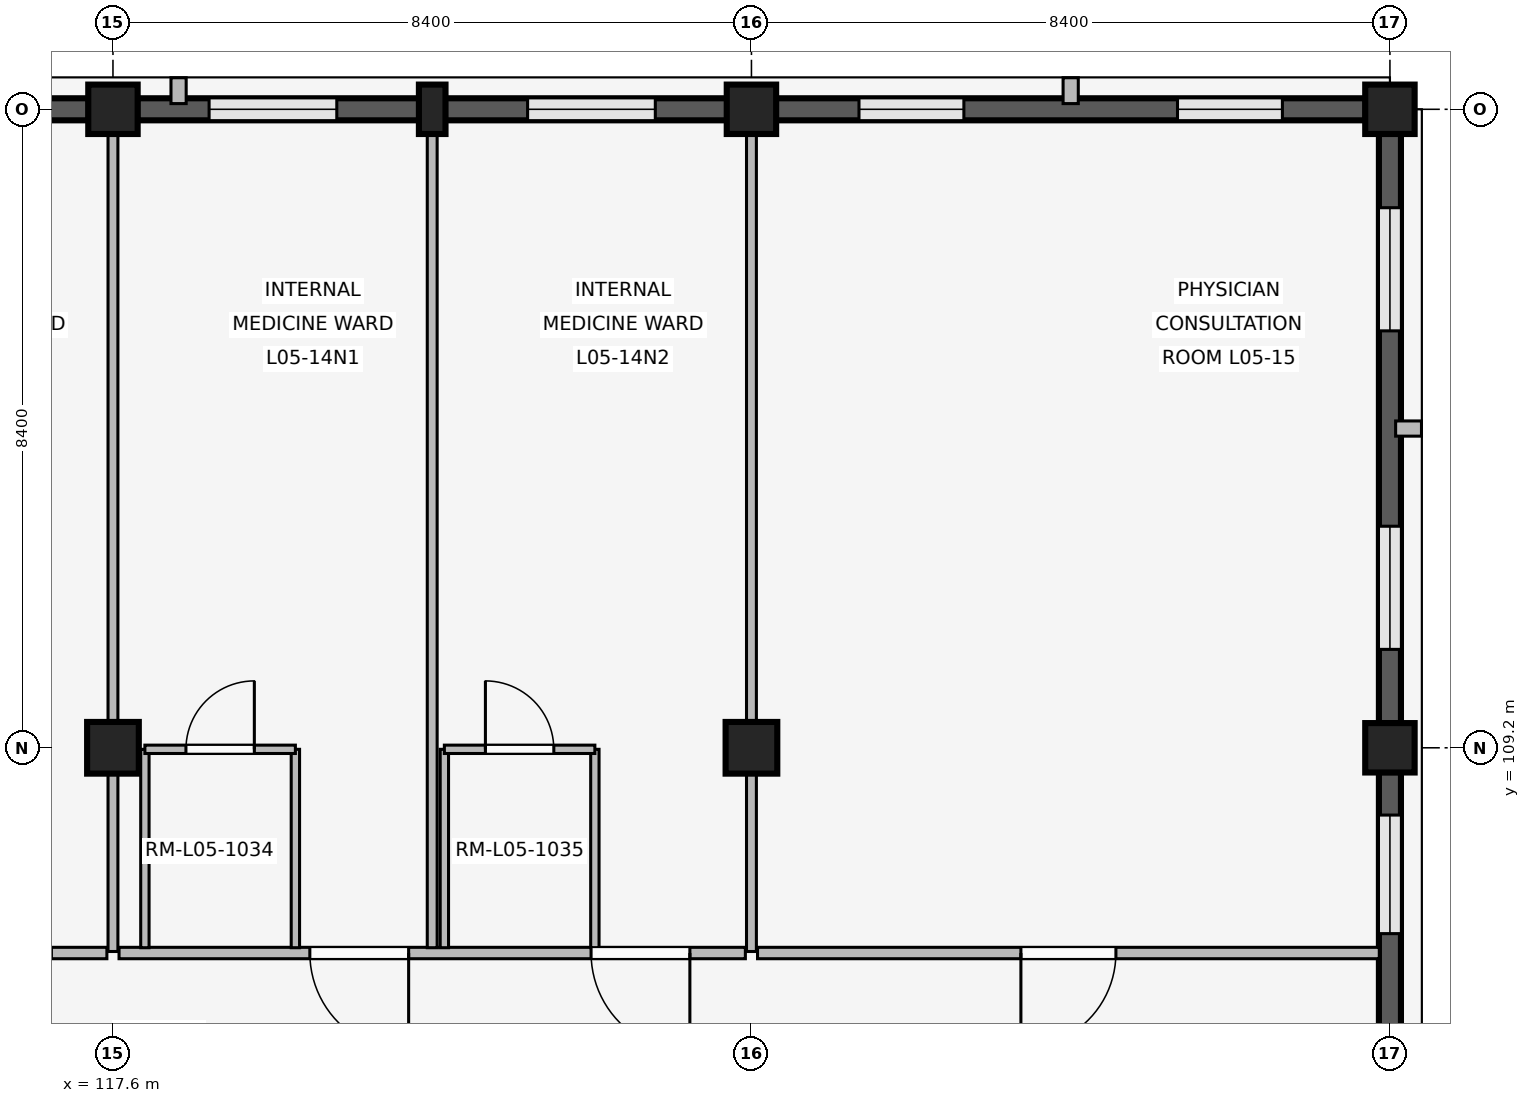
"""IFC4 building model, lengths in metres.
Left out: names, types, materials, properties, quantities, classifications, styles, units other than length and angle.
Written with IfcOpenShell. Run it as: python <this file> out.ifc"""

import sys

from ifc_helpers import new_model, si_unit, direction, frame, frame_2d, origin, origin_2d, place, context, subcontext, project, spatial, rectangle, extrude, element, fill, save


model = new_model("IFC4")
c1 = context("Model", 3, precision=1e-05, world=origin(), true_north=direction((0.0, 1.0)))
c2 = subcontext(c1, "Body", "Model", "MODEL_VIEW")
j1 = project(units=[si_unit("LENGTHUNIT", "METRE"), si_unit("PLANEANGLEUNIT", "RADIAN")], contexts=[c1])
p1 = place(None, origin())
s1 = spatial("IfcSite", under=j1, at=p1, CompositionType="ELEMENT")
p2 = place(p1, origin())
s2 = spatial("IfcBuilding", under=s1, at=p2, CompositionType="ELEMENT")
p3 = place(p2, frame((0.0, 0.0, 20.4)))
s3 = spatial("IfcBuildingStorey", under=s2, at=p3, CompositionType="ELEMENT", Elevation=20.4)
p4 = place(p3, frame((117.6, 109.2, 0.0), z_axis=(0.0, 0.0, 1.0), x_axis=(1.0, 0.0, 0.0)))
e1 = element("IfcColumn", 1, at=p4, inside=s3, PredefinedType="COLUMN", context=c2, shape_type="SweptSolid", body=[
    extrude(rectangle(XDim=0.68, YDim=0.68, at=origin_2d()), origin(), (0.0, 0.0, 1.0), 4.2),
])
p5 = place(p3, frame((117.6, 117.6, 0.0), z_axis=(0.0, 0.0, 1.0), x_axis=(1.0, 0.0, 0.0)))
e2 = element("IfcColumn", 2, at=p5, inside=s3, PredefinedType="COLUMN", context=c2, shape_type="SweptSolid", body=[
    extrude(rectangle(XDim=0.65, YDim=0.65, at=origin_2d()), origin(), (0.0, 0.0, 1.0), 4.2),
])
p6 = place(p3, frame((126.0, 109.2, 0.0), z_axis=(0.0, 0.0, 1.0), x_axis=(1.0, 0.0, 0.0)))
e3 = element("IfcColumn", 3, at=p6, inside=s3, PredefinedType="COLUMN", context=c2, shape_type="SweptSolid", body=[
    extrude(rectangle(XDim=0.68, YDim=0.68, at=origin_2d()), origin(), (0.0, 0.0, 1.0), 4.2),
])
for number, where, z_axis, x_axis in (
    (4, (126.0, 117.6, 0.0), (0.0, 0.0, 1.0), (1.0, 0.0, 0.0)),
    (5, (134.4, 109.2, 0.0), (0.0, 0.0, 1.0), (1.0, 0.0, 0.0)),
    (6, (134.4, 117.6, 0.0), (0.0, 0.0, 1.0), (1.0, 0.0, 0.0)),
):
    element("IfcColumn", number, at=place(p3, frame(where, z_axis=z_axis, x_axis=x_axis)), inside=s3, PredefinedType="COLUMN", context=c2, shape_type="SweptSolid", body=[
        extrude(rectangle(XDim=0.65, YDim=0.65, at=origin_2d()), origin(), (0.0, 0.0, 1.0), 4.2),
    ])
p7 = place(p3, frame((121.8, 117.6, 0.0), z_axis=(0.0, 0.0, 1.0), x_axis=(1.0, 0.0, 0.0)))
e7 = element("IfcColumn", 7, at=p7, inside=s3, PredefinedType="PILASTER", context=c2, shape_type="SweptSolid", body=[
    extrude(rectangle(XDim=0.35, YDim=0.65, at=origin_2d()), origin(), (0.0, 0.0, 1.0), 4.2),
])
p8 = place(p3, frame((109.52, 117.6, 0.0), z_axis=(0.0, 0.0, 1.0), x_axis=(1.0, 0.0, 0.0)))
e8 = element("IfcWall", 8, at=p8, inside=s3, PredefinedType="SOLIDWALL", context=c2, shape_type="SweptSolid", body=[
    extrude(rectangle(XDim=7.76, YDim=0.29, at=frame_2d((3.88, 0.0))), origin(), (0.0, 0.0, 1.0), 3.34),
])
p9 = place(p8, frame((1.015, 0.0, 0.85)))
e9 = element("IfcOpeningElement", 9, at=p9, cuts=e8, PredefinedType="OPENING", context=c2, shape_type="SweptSolid", body=[
    extrude(rectangle(XDim=1.54, YDim=1.85, at=frame_2d((0.77, 0.925))), frame((0.0, 0.155, 0.0), z_axis=(0.0, -1.0, 0.0), x_axis=(1.0, 0.0, 0.0)), (0.0, 0.0, 1.0), 0.31),
])
p10 = place(p8, frame((5.205, 0.0, 0.85)))
e10 = element("IfcOpeningElement", 10, at=p10, cuts=e8, PredefinedType="OPENING", context=c2, shape_type="SweptSolid", body=[
    extrude(rectangle(XDim=1.54, YDim=1.85, at=frame_2d((0.77, 0.925))), frame((0.0, 0.155, 0.0), z_axis=(0.0, -1.0, 0.0), x_axis=(1.0, 0.0, 0.0)), (0.0, 0.0, 1.0), 0.31),
])
p11 = place(p3, frame((117.92, 117.6, 0.0), z_axis=(0.0, 0.0, 1.0), x_axis=(1.0, 0.0, 0.0)))
e11 = element("IfcWall", 11, at=p11, inside=s3, PredefinedType="SOLIDWALL", context=c2, shape_type="SweptSolid", body=[
    extrude(rectangle(XDim=7.76, YDim=0.29, at=frame_2d((3.88, 0.0))), origin(), (0.0, 0.0, 1.0), 3.34),
])
p12 = place(p11, frame((0.945, 0.0, 0.85)))
e12 = element("IfcOpeningElement", 12, at=p12, cuts=e11, PredefinedType="OPENING", context=c2, shape_type="SweptSolid", body=[
    extrude(rectangle(XDim=1.68, YDim=2.05, at=frame_2d((0.84, 1.025))), frame((0.0, 0.155, 0.0), z_axis=(0.0, -1.0, 0.0), x_axis=(1.0, 0.0, 0.0)), (0.0, 0.0, 1.0), 0.31),
])
p13 = place(p11, frame((5.135, 0.0, 0.85)))
e13 = element("IfcOpeningElement", 13, at=p13, cuts=e11, PredefinedType="OPENING", context=c2, shape_type="SweptSolid", body=[
    extrude(rectangle(XDim=1.68, YDim=2.05, at=frame_2d((0.84, 1.025))), frame((0.0, 0.155, 0.0), z_axis=(0.0, -1.0, 0.0), x_axis=(1.0, 0.0, 0.0)), (0.0, 0.0, 1.0), 0.31),
])
p14 = place(p3, frame((118.463, 117.675, 0.0), z_axis=(0.0, 0.0, 1.0), x_axis=(0.0, 1.0, 0.0)))
e14 = element("IfcWall", 14, at=p14, inside=s3, PredefinedType="ELEMENTEDWALL", context=c2, shape_type="SweptSolid", body=[
    extrude(rectangle(XDim=0.34, YDim=0.2, at=frame_2d((0.17, 0.0))), origin(), (0.0, 0.0, 1.0), 3.32),
])
p15 = place(p3, frame((134.4, 108.88, 0.0), z_axis=(0.0, 0.0, 1.0), x_axis=(0.0, -1.0, 0.0)))
e15 = element("IfcWall", 15, at=p15, inside=s3, PredefinedType="SOLIDWALL", context=c2, shape_type="SweptSolid", body=[
    extrude(rectangle(XDim=7.76, YDim=0.29, at=frame_2d((3.88, 0.0))), origin(), (0.0, 0.0, 1.0), 3.34),
])
p16 = place(p15, frame((0.565, 0.0, 0.85)))
e16 = element("IfcOpeningElement", 16, at=p16, cuts=e15, PredefinedType="OPENING", context=c2, shape_type="SweptSolid", body=[
    extrude(rectangle(XDim=1.56, YDim=1.7, at=frame_2d((0.78, 0.85))), frame((0.0, 0.155, 0.0), z_axis=(0.0, -1.0, 0.0), x_axis=(1.0, 0.0, 0.0)), (0.0, 0.0, 1.0), 0.31),
])
p17 = place(p15, frame((5.635, 0.0, 0.85)))
e17 = element("IfcOpeningElement", 17, at=p17, cuts=e15, PredefinedType="OPENING", context=c2, shape_type="SweptSolid", body=[
    extrude(rectangle(XDim=1.56, YDim=1.7, at=frame_2d((0.78, 0.85))), frame((0.0, 0.155, 0.0), z_axis=(0.0, -1.0, 0.0), x_axis=(1.0, 0.0, 0.0)), (0.0, 0.0, 1.0), 0.31),
])
p18 = place(p3, frame((126.32, 117.6, 0.0), z_axis=(0.0, 0.0, 1.0), x_axis=(1.0, 0.0, 0.0)))
e18 = element("IfcWall", 18, at=p18, inside=s3, PredefinedType="SOLIDWALL", context=c2, shape_type="SweptSolid", body=[
    extrude(rectangle(XDim=7.76, YDim=0.29, at=frame_2d((3.88, 0.0))), origin(), (0.0, 0.0, 1.0), 3.34),
])
p19 = place(p18, frame((1.095, 0.0, 0.85)))
e19 = element("IfcOpeningElement", 19, at=p19, cuts=e18, PredefinedType="OPENING", context=c2, shape_type="SweptSolid", body=[
    extrude(rectangle(XDim=1.38, YDim=1.5, at=frame_2d((0.69, 0.75))), frame((0.0, 0.155, 0.0), z_axis=(0.0, -1.0, 0.0), x_axis=(1.0, 0.0, 0.0)), (0.0, 0.0, 1.0), 0.31),
])
p20 = place(p18, frame((5.285, 0.0, 0.85)))
e20 = element("IfcOpeningElement", 20, at=p20, cuts=e18, PredefinedType="OPENING", context=c2, shape_type="SweptSolid", body=[
    extrude(rectangle(XDim=1.38, YDim=1.5, at=frame_2d((0.69, 0.75))), frame((0.0, 0.155, 0.0), z_axis=(0.0, -1.0, 0.0), x_axis=(1.0, 0.0, 0.0)), (0.0, 0.0, 1.0), 0.31),
])
p21 = place(p3, frame((130.2, 117.675, 0.0), z_axis=(0.0, 0.0, 1.0), x_axis=(0.0, 1.0, 0.0)))
e21 = element("IfcWall", 21, at=p21, inside=s3, PredefinedType="ELEMENTEDWALL", context=c2, shape_type="SweptSolid", body=[
    extrude(rectangle(XDim=0.34, YDim=0.2, at=frame_2d((0.17, 0.0))), origin(), (0.0, 0.0, 1.0), 3.32),
])
p22 = place(p3, frame((134.4, 117.28, 0.0), z_axis=(0.0, 0.0, 1.0), x_axis=(0.0, -1.0, 0.0)))
e22 = element("IfcWall", 22, at=p22, inside=s3, PredefinedType="SOLIDWALL", context=c2, shape_type="SweptSolid", body=[
    extrude(rectangle(XDim=7.76, YDim=0.29, at=frame_2d((3.88, 0.0))), origin(), (0.0, 0.0, 1.0), 3.34),
])
p23 = place(p22, frame((0.975, 0.0, 0.85)))
e23 = element("IfcOpeningElement", 23, at=p23, cuts=e22, PredefinedType="OPENING", context=c2, shape_type="SweptSolid", body=[
    extrude(rectangle(XDim=1.62, YDim=1.8, at=frame_2d((0.81, 0.9))), frame((0.0, 0.155, 0.0), z_axis=(0.0, -1.0, 0.0), x_axis=(1.0, 0.0, 0.0)), (0.0, 0.0, 1.0), 0.31),
])
p24 = place(p22, frame((5.165, 0.0, 0.85)))
e24 = element("IfcOpeningElement", 24, at=p24, cuts=e22, PredefinedType="OPENING", context=c2, shape_type="SweptSolid", body=[
    extrude(rectangle(XDim=1.62, YDim=1.8, at=frame_2d((0.81, 0.9))), frame((0.0, 0.155, 0.0), z_axis=(0.0, -1.0, 0.0), x_axis=(1.0, 0.0, 0.0)), (0.0, 0.0, 1.0), 0.31),
])
p25 = place(p3, frame((134.475, 113.4, 0.0), z_axis=(0.0, 0.0, 1.0), x_axis=(1.0, 0.0, 0.0)))
e25 = element("IfcWall", 25, at=p25, inside=s3, PredefinedType="ELEMENTEDWALL", context=c2, shape_type="SweptSolid", body=[
    extrude(rectangle(XDim=0.34, YDim=0.2, at=frame_2d((0.17, 0.0))), origin(), (0.0, 0.0, 1.0), 3.32),
])
p26 = place(p3, frame((117.52, 106.5, 0.0), z_axis=(0.0, 0.0, 1.0), x_axis=(-1.0, 0.0, 0.0)))
e26 = element("IfcWall", 26, at=p26, inside=s3, PredefinedType="PARTITIONING", context=c2, shape_type="SweptSolid", body=[
    extrude(rectangle(XDim=8.24, YDim=0.15, at=frame_2d((4.12, 0.0))), origin(), (0.0, 0.0, 1.0), 3.32),
])
p27 = place(p26, frame((0.73, 0.0, 0.0)))
e27 = element("IfcOpeningElement", 27, at=p27, cuts=e26, PredefinedType="OPENING", context=c2, shape_type="SweptSolid", body=[
    extrude(rectangle(XDim=1.3, YDim=2.25, at=frame_2d((0.65, 1.125))), frame((0.0, 0.085, 0.0), z_axis=(0.0, -1.0, 0.0), x_axis=(1.0, 0.0, 0.0)), (0.0, 0.0, 1.0), 0.17),
])
p28 = place(p26, frame((4.43, 0.0, 0.0)))
e28 = element("IfcOpeningElement", 28, at=p28, cuts=e26, PredefinedType="OPENING", context=c2, shape_type="SweptSolid", body=[
    extrude(rectangle(XDim=1.3, YDim=2.25, at=frame_2d((0.65, 1.125))), frame((0.0, 0.085, 0.0), z_axis=(0.0, -1.0, 0.0), x_axis=(1.0, 0.0, 0.0)), (0.0, 0.0, 1.0), 0.17),
])
p29 = place(p3, frame((117.6, 106.52, 0.0), z_axis=(0.0, 0.0, 1.0), x_axis=(0.0, 1.0, 0.0)))
e29 = element("IfcWall", 29, at=p29, inside=s3, PredefinedType="PARTITIONING", context=c2, shape_type="SweptSolid", body=[
    extrude(rectangle(XDim=10.94, YDim=0.13, at=frame_2d((5.47, 0.0))), origin(), (0.0, 0.0, 1.0), 3.32),
])
p30 = place(p3, frame((125.92, 106.5, 0.0), z_axis=(0.0, 0.0, 1.0), x_axis=(-1.0, 0.0, 0.0)))
e30 = element("IfcWall", 30, at=p30, inside=s3, PredefinedType="PARTITIONING", context=c2, shape_type="SweptSolid", body=[
    extrude(rectangle(XDim=8.24, YDim=0.15, at=frame_2d((4.12, 0.0))), origin(), (0.0, 0.0, 1.0), 3.32),
])
p31 = place(p30, frame((0.73, 0.0, 0.0)))
e31 = element("IfcOpeningElement", 31, at=p31, cuts=e30, PredefinedType="OPENING", context=c2, shape_type="SweptSolid", body=[
    extrude(rectangle(XDim=1.3, YDim=2.25, at=frame_2d((0.65, 1.125))), frame((0.0, 0.085, 0.0), z_axis=(0.0, -1.0, 0.0), x_axis=(1.0, 0.0, 0.0)), (0.0, 0.0, 1.0), 0.17),
])
p32 = place(p30, frame((4.43, 0.0, 0.0)))
e32 = element("IfcOpeningElement", 32, at=p32, cuts=e30, PredefinedType="OPENING", context=c2, shape_type="SweptSolid", body=[
    extrude(rectangle(XDim=1.3, YDim=2.25, at=frame_2d((0.65, 1.125))), frame((0.0, 0.085, 0.0), z_axis=(0.0, -1.0, 0.0), x_axis=(1.0, 0.0, 0.0)), (0.0, 0.0, 1.0), 0.17),
])
p33 = place(p3, frame((121.8, 106.57, 0.0), z_axis=(0.0, 0.0, 1.0), x_axis=(0.0, 1.0, 0.0)))
e33 = element("IfcWall", 33, at=p33, inside=s3, PredefinedType="PARTITIONING", context=c2, shape_type="SweptSolid", body=[
    extrude(rectangle(XDim=10.93, YDim=0.13, at=frame_2d((5.465, 0.0))), origin(), (0.0, 0.0, 1.0), 3.32),
])
for number, where, z_axis, x_axis in (
    (34, (118.02, 106.57, 0.0), (0.0, 0.0, 1.0), (0.0, 1.0, 0.0)),
    (35, (120.0, 106.57, 0.0), (0.0, 0.0, 1.0), (0.0, 1.0, 0.0)),
):
    element("IfcWall", number, at=place(p3, frame(where, z_axis=z_axis, x_axis=x_axis)), inside=s3, PredefinedType="PARTITIONING", context=c2, shape_type="SweptSolid", body=[
        extrude(rectangle(XDim=2.61, YDim=0.11, at=frame_2d((1.305, 0.0))), origin(), (0.0, 0.0, 1.0), 3.32),
    ])
p34 = place(p3, frame((118.02, 109.18, 0.0), z_axis=(0.0, 0.0, 1.0), x_axis=(1.0, 0.0, 0.0)))
e36 = element("IfcWall", 36, at=p34, inside=s3, PredefinedType="PARTITIONING", context=c2, shape_type="SweptSolid", body=[
    extrude(rectangle(XDim=1.98, YDim=0.11, at=frame_2d((0.99, 0.0))), origin(), (0.0, 0.0, 1.0), 3.32),
])
p35 = place(p34, frame((0.54, 0.0, 0.0)))
e37 = element("IfcOpeningElement", 37, at=p35, cuts=e36, PredefinedType="OPENING", context=c2, shape_type="SweptSolid", body=[
    extrude(rectangle(XDim=0.9, YDim=2.1, at=frame_2d((0.45, 1.05))), frame((0.0, 0.065, 0.0), z_axis=(0.0, -1.0, 0.0), x_axis=(1.0, 0.0, 0.0)), (0.0, 0.0, 1.0), 0.13),
])
for number, where, z_axis, x_axis in (
    (38, (121.96, 106.57, 0.0), (0.0, 0.0, 1.0), (0.0, 1.0, 0.0)),
    (39, (123.94, 106.57, 0.0), (0.0, 0.0, 1.0), (0.0, 1.0, 0.0)),
):
    element("IfcWall", number, at=place(p3, frame(where, z_axis=z_axis, x_axis=x_axis)), inside=s3, PredefinedType="PARTITIONING", context=c2, shape_type="SweptSolid", body=[
        extrude(rectangle(XDim=2.61, YDim=0.11, at=frame_2d((1.305, 0.0))), origin(), (0.0, 0.0, 1.0), 3.32),
    ])
p36 = place(p3, frame((121.96, 109.18, 0.0), z_axis=(0.0, 0.0, 1.0), x_axis=(1.0, 0.0, 0.0)))
e40 = element("IfcWall", 40, at=p36, inside=s3, PredefinedType="PARTITIONING", context=c2, shape_type="SweptSolid", body=[
    extrude(rectangle(XDim=1.98, YDim=0.11, at=frame_2d((0.99, 0.0))), origin(), (0.0, 0.0, 1.0), 3.32),
])
p37 = place(p36, frame((0.54, 0.0, 0.0)))
e41 = element("IfcOpeningElement", 41, at=p37, cuts=e40, PredefinedType="OPENING", context=c2, shape_type="SweptSolid", body=[
    extrude(rectangle(XDim=0.9, YDim=2.1, at=frame_2d((0.45, 1.05))), frame((0.0, 0.065, 0.0), z_axis=(0.0, -1.0, 0.0), x_axis=(1.0, 0.0, 0.0)), (0.0, 0.0, 1.0), 0.13),
])
p38 = place(p3, frame((126.0, 106.52, 0.0), z_axis=(0.0, 0.0, 1.0), x_axis=(0.0, 1.0, 0.0)))
e42 = element("IfcWall", 42, at=p38, inside=s3, PredefinedType="PARTITIONING", context=c2, shape_type="SweptSolid", body=[
    extrude(rectangle(XDim=10.94, YDim=0.13, at=frame_2d((5.47, 0.0))), origin(), (0.0, 0.0, 1.0), 3.32),
])
p39 = place(p3, frame((134.26, 106.5, 0.0), z_axis=(0.0, 0.0, 1.0), x_axis=(-1.0, 0.0, 0.0)))
e43 = element("IfcWall", 43, at=p39, inside=s3, PredefinedType="PARTITIONING", context=c2, shape_type="SweptSolid", body=[
    extrude(rectangle(XDim=8.18, YDim=0.15, at=frame_2d((4.09, 0.0))), origin(), (0.0, 0.0, 1.0), 3.32),
])
p40 = place(p39, frame((3.465, 0.0, 0.0)))
e44 = element("IfcOpeningElement", 44, at=p40, cuts=e43, PredefinedType="OPENING", context=c2, shape_type="SweptSolid", body=[
    extrude(rectangle(XDim=1.25, YDim=2.2, at=frame_2d((0.625, 1.1))), frame((0.0, 0.085, 0.0), z_axis=(0.0, -1.0, 0.0), x_axis=(1.0, 0.0, 0.0)), (0.0, 0.0, 1.0), 0.17),
])
p41 = place(p12, origin())
e45 = element("IfcWindow", 45, at=p41, inside=s3, PartitioningType="SINGLE_PANEL", PredefinedType="WINDOW", context=c2, shape_type="SweptSolid", body=[
    extrude(rectangle(XDim=1.68, YDim=2.05, at=frame_2d((0.84, 1.025))), frame((0.0, 0.03, 0.0), z_axis=(0.0, -1.0, 0.0), x_axis=(1.0, 0.0, 0.0)), (0.0, 0.0, 1.0), 0.06),
])
fill(e12, e45)
p42 = place(p13, origin())
e46 = element("IfcWindow", 46, at=p42, inside=s3, PartitioningType="SINGLE_PANEL", PredefinedType="WINDOW", context=c2, shape_type="SweptSolid", body=[
    extrude(rectangle(XDim=1.68, YDim=2.05, at=frame_2d((0.84, 1.025))), frame((0.0, 0.03, 0.0), z_axis=(0.0, -1.0, 0.0), x_axis=(1.0, 0.0, 0.0)), (0.0, 0.0, 1.0), 0.06),
])
fill(e13, e46)
p43 = place(p16, origin())
e47 = element("IfcWindow", 47, at=p43, inside=s3, PartitioningType="SINGLE_PANEL", PredefinedType="WINDOW", context=c2, shape_type="SweptSolid", body=[
    extrude(rectangle(XDim=1.56, YDim=1.7, at=frame_2d((0.78, 0.85))), frame((0.0, 0.03, 0.0), z_axis=(0.0, -1.0, 0.0), x_axis=(1.0, 0.0, 0.0)), (0.0, 0.0, 1.0), 0.06),
])
fill(e16, e47)
p44 = place(p19, origin())
e48 = element("IfcWindow", 48, at=p44, inside=s3, PartitioningType="SINGLE_PANEL", PredefinedType="WINDOW", context=c2, shape_type="SweptSolid", body=[
    extrude(rectangle(XDim=1.38, YDim=1.5, at=frame_2d((0.69, 0.75))), frame((0.0, 0.03, 0.0), z_axis=(0.0, -1.0, 0.0), x_axis=(1.0, 0.0, 0.0)), (0.0, 0.0, 1.0), 0.06),
])
fill(e19, e48)
p45 = place(p20, origin())
e49 = element("IfcWindow", 49, at=p45, inside=s3, PartitioningType="SINGLE_PANEL", PredefinedType="WINDOW", context=c2, shape_type="SweptSolid", body=[
    extrude(rectangle(XDim=1.38, YDim=1.5, at=frame_2d((0.69, 0.75))), frame((0.0, 0.03, 0.0), z_axis=(0.0, -1.0, 0.0), x_axis=(1.0, 0.0, 0.0)), (0.0, 0.0, 1.0), 0.06),
])
fill(e20, e49)
p46 = place(p23, origin())
e50 = element("IfcWindow", 50, at=p46, inside=s3, PartitioningType="SINGLE_PANEL", PredefinedType="WINDOW", context=c2, shape_type="SweptSolid", body=[
    extrude(rectangle(XDim=1.62, YDim=1.8, at=frame_2d((0.81, 0.9))), frame((0.0, 0.03, 0.0), z_axis=(0.0, -1.0, 0.0), x_axis=(1.0, 0.0, 0.0)), (0.0, 0.0, 1.0), 0.06),
])
fill(e23, e50)
p47 = place(p24, origin())
e51 = element("IfcWindow", 51, at=p47, inside=s3, PartitioningType="SINGLE_PANEL", PredefinedType="WINDOW", context=c2, shape_type="SweptSolid", body=[
    extrude(rectangle(XDim=1.62, YDim=1.8, at=frame_2d((0.81, 0.9))), frame((0.0, 0.03, 0.0), z_axis=(0.0, -1.0, 0.0), x_axis=(1.0, 0.0, 0.0)), (0.0, 0.0, 1.0), 0.06),
])
fill(e24, e51)
p48 = place(p31, origin())
e52 = element("IfcDoor", 52, at=p48, inside=s3, OperationType="SINGLE_SWING_LEFT", PredefinedType="DOOR", context=c2, shape_type="SweptSolid", body=[
    extrude(rectangle(XDim=1.3, YDim=2.25, at=frame_2d((0.65, 1.125))), frame((0.0, 0.025, 0.0), z_axis=(0.0, -1.0, 0.0), x_axis=(1.0, 0.0, 0.0)), (0.0, 0.0, 1.0), 0.05),
])
fill(e31, e52)
p49 = place(p32, origin())
e53 = element("IfcDoor", 53, at=p49, inside=s3, OperationType="SINGLE_SWING_LEFT", PredefinedType="DOOR", context=c2, shape_type="SweptSolid", body=[
    extrude(rectangle(XDim=1.3, YDim=2.25, at=frame_2d((0.65, 1.125))), frame((0.0, 0.025, 0.0), z_axis=(0.0, -1.0, 0.0), x_axis=(1.0, 0.0, 0.0)), (0.0, 0.0, 1.0), 0.05),
])
fill(e32, e53)
p50 = place(p35, origin())
e54 = element("IfcDoor", 54, at=p50, inside=s3, OperationType="SINGLE_SWING_RIGHT", PredefinedType="DOOR", context=c2, shape_type="SweptSolid", body=[
    extrude(rectangle(XDim=0.9, YDim=2.1, at=frame_2d((0.45, 1.05))), frame((0.0, 0.025, 0.0), z_axis=(0.0, -1.0, 0.0), x_axis=(1.0, 0.0, 0.0)), (0.0, 0.0, 1.0), 0.05),
])
fill(e37, e54)
p51 = place(p37, origin())
e55 = element("IfcDoor", 55, at=p51, inside=s3, OperationType="SINGLE_SWING_LEFT", PredefinedType="DOOR", context=c2, shape_type="SweptSolid", body=[
    extrude(rectangle(XDim=0.9, YDim=2.1, at=frame_2d((0.45, 1.05))), frame((0.0, 0.025, 0.0), z_axis=(0.0, -1.0, 0.0), x_axis=(1.0, 0.0, 0.0)), (0.0, 0.0, 1.0), 0.05),
])
fill(e41, e55)
p52 = place(p40, origin())
e56 = element("IfcDoor", 56, at=p52, inside=s3, OperationType="SINGLE_SWING_RIGHT", PredefinedType="DOOR", context=c2, shape_type="SweptSolid", body=[
    extrude(rectangle(XDim=1.25, YDim=2.2, at=frame_2d((0.625, 1.1))), frame((0.0, 0.025, 0.0), z_axis=(0.0, -1.0, 0.0), x_axis=(1.0, 0.0, 0.0)), (0.0, 0.0, 1.0), 0.05),
])
fill(e44, e56)
save(model, sys.argv[1])
